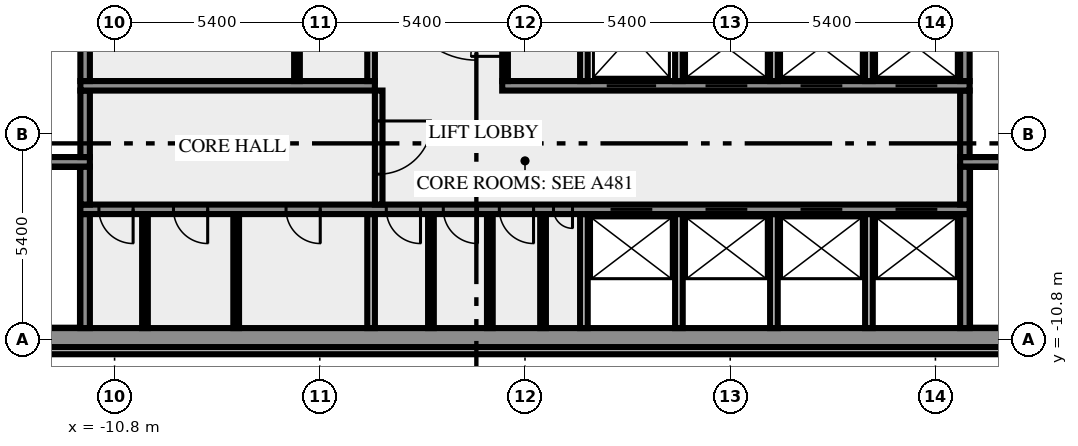
"""IFC4 building model, lengths in metres.
Left out: names, types, materials, properties, quantities, classifications, styles, units other than length and angle.
Written with IfcOpenShell. Run it as: python <this file> out.ifc"""

import sys

from ifc_helpers import new_model, si_unit, direction, frame, frame_2d, origin, place, context, subcontext, project, spatial, rectangle, extrude, element, fill, save


model = new_model("IFC4")
c1 = context("Model", 3, precision=1e-05, world=origin(), true_north=direction((0.0, 1.0)))
c2 = subcontext(c1, "Body", "Model", "MODEL_VIEW")
j1 = project(units=[si_unit("LENGTHUNIT", "METRE"), si_unit("PLANEANGLEUNIT", "RADIAN")], contexts=[c1])
p1 = place(None, origin())
s1 = spatial("IfcSite", under=j1, at=p1, CompositionType="ELEMENT")
p2 = place(p1, origin())
s2 = spatial("IfcBuilding", under=s1, at=p2, CompositionType="ELEMENT")
p3 = place(p2, frame((0.0, 0.0, 156.0)))
s3 = spatial("IfcBuildingStorey", under=s2, at=p3, CompositionType="ELEMENT", Elevation=156.0)
p4 = place(p3, frame((-17.444, -11.088, 0.0), z_axis=(0.0, 0.0, 1.0), x_axis=(1.0, 0.0, 0.0)))
e1 = element("IfcWall", 1, at=p4, inside=s3, PredefinedType="SOLIDWALL", context=c2, shape_type="SweptSolid", body=[
    extrude(rectangle(XDim=34.888, YDim=0.2, at=frame_2d((17.444, 0.0))), origin(), (0.0, 0.0, 1.0), 3.65),
])
p5 = place(p3, frame((-20.0, -10.75, 0.0), z_axis=(0.0, 0.0, 1.0), x_axis=(1.0, 0.0, 0.0)))
e2 = element("IfcWall", 2, at=p5, inside=s3, PredefinedType="SHEAR", context=c2, shape_type="SweptSolid", body=[
    extrude(rectangle(XDim=40.0, YDim=0.5, at=frame_2d((20.0, 0.0))), origin(), (0.0, 0.0, 1.0), 3.65),
])
p6 = place(p5, frame((0.8, 0.0, 1.0)))
e3 = element("IfcOpeningElement", 3, at=p6, cuts=e2, PredefinedType="OPENING", context=c2, shape_type="SweptSolid", body=[
    extrude(rectangle(XDim=1.2, YDim=1.2, at=frame_2d((0.6, 0.6))), frame((0.0, 0.26, 0.0), z_axis=(0.0, -1.0, 0.0), x_axis=(1.0, 0.0, 0.0)), (0.0, 0.0, 1.0), 0.52),
])
p7 = place(p5, frame((38.0, 0.0, 1.0)))
e4 = element("IfcOpeningElement", 4, at=p7, cuts=e2, PredefinedType="OPENING", context=c2, shape_type="SweptSolid", body=[
    extrude(rectangle(XDim=1.2, YDim=1.2, at=frame_2d((0.6, 0.6))), frame((0.0, 0.26, 0.0), z_axis=(0.0, -1.0, 0.0), x_axis=(1.0, 0.0, 0.0)), (0.0, 0.0, 1.0), 0.52),
])
p8 = place(p3, frame((-11.575, -10.5, 0.0), z_axis=(0.0, 0.0, 1.0), x_axis=(0.0, 1.0, 0.0)))
e5 = element("IfcWall", 5, at=p8, inside=s3, PredefinedType="SHEAR", context=c2, shape_type="SweptSolid", body=[
    extrude(rectangle(XDim=3.0, YDim=0.25, at=frame_2d((1.5, 0.0))), origin(), (0.0, 0.0, 1.0), 3.65),
])
for number, where, z_axis, x_axis in (
    (6, (-10.0, -10.5, 0.0), (0.0, 0.0, 1.0), (0.0, 1.0, 0.0)),
    (7, (-7.6, -10.5, 0.0), (0.0, 0.0, 1.0), (0.0, 1.0, 0.0)),
):
    element("IfcWall", number, at=place(p3, frame(where, z_axis=z_axis, x_axis=x_axis)), inside=s3, PredefinedType="PARTITIONING", context=c2, shape_type="SweptSolid", body=[
        extrude(rectangle(XDim=3.0, YDim=0.15, at=frame_2d((1.5, 0.0))), origin(), (0.0, 0.0, 1.0), 3.65),
    ])
p9 = place(p3, frame((-4.05, -10.5, 0.0), z_axis=(0.0, 0.0, 1.0), x_axis=(0.0, 1.0, 0.0)))
e8 = element("IfcWall", 8, at=p9, inside=s3, PredefinedType="SOLIDWALL", context=c2, shape_type="SweptSolid", body=[
    extrude(rectangle(XDim=3.0, YDim=0.2, at=frame_2d((1.5, 0.0))), origin(), (0.0, 0.0, 1.0), 3.65),
])
for number, where, z_axis, x_axis in (
    (9, (-2.475, -10.5, 0.0), (0.0, 0.0, 1.0), (0.0, 1.0, 0.0)),
    (10, (-0.925, -10.5, 0.0), (0.0, 0.0, 1.0), (0.0, 1.0, 0.0)),
    (11, (0.475, -10.5, 0.0), (0.0, 0.0, 1.0), (0.0, 1.0, 0.0)),
):
    element("IfcWall", number, at=place(p3, frame(where, z_axis=z_axis, x_axis=x_axis)), inside=s3, PredefinedType="PARTITIONING", context=c2, shape_type="SweptSolid", body=[
        extrude(rectangle(XDim=3.0, YDim=0.15, at=frame_2d((1.5, 0.0))), origin(), (0.0, 0.0, 1.0), 3.65),
    ])
for number, where, z_axis, x_axis in (
    (12, (1.55, -10.5, 0.0), (0.0, 0.0, 1.0), (0.0, 1.0, 0.0)),
    (13, (4.05, -10.5, 0.0), (0.0, 0.0, 1.0), (0.0, 1.0, 0.0)),
    (14, (6.55, -10.5, 0.0), (0.0, 0.0, 1.0), (0.0, 1.0, 0.0)),
    (15, (9.05, -10.5, 0.0), (0.0, 0.0, 1.0), (0.0, 1.0, 0.0)),
):
    element("IfcWall", number, at=place(p3, frame(where, z_axis=z_axis, x_axis=x_axis)), inside=s3, PredefinedType="SOLIDWALL", context=c2, shape_type="SweptSolid", body=[
        extrude(rectangle(XDim=3.0, YDim=0.2, at=frame_2d((1.5, 0.0))), origin(), (0.0, 0.0, 1.0), 3.65),
    ])
p10 = place(p3, frame((11.575, -10.5, 0.0), z_axis=(0.0, 0.0, 1.0), x_axis=(0.0, 1.0, 0.0)))
e16 = element("IfcWall", 16, at=p10, inside=s3, PredefinedType="SHEAR", context=c2, shape_type="SweptSolid", body=[
    extrude(rectangle(XDim=3.0, YDim=0.25, at=frame_2d((1.5, 0.0))), origin(), (0.0, 0.0, 1.0), 3.65),
])
p11 = place(p3, frame((11.7, -7.375, 0.0), z_axis=(0.0, 0.0, 1.0), x_axis=(-1.0, 0.0, 0.0)))
e17 = element("IfcWall", 17, at=p11, inside=s3, PredefinedType="SHEAR", context=c2, shape_type="SweptSolid", body=[
    extrude(rectangle(XDim=23.4, YDim=0.25, at=frame_2d((11.7, 0.0))), origin(), (0.0, 0.0, 1.0), 3.65),
])
p12 = place(p11, frame((22.012, 0.0, 0.0)))
e18 = element("IfcOpeningElement", 18, at=p12, cuts=e17, PredefinedType="OPENING", context=c2, shape_type="SweptSolid", body=[
    extrude(rectangle(XDim=0.9, YDim=2.1, at=frame_2d((0.45, 1.05))), frame((0.0, 0.135, 0.0), z_axis=(0.0, -1.0, 0.0), x_axis=(1.0, 0.0, 0.0)), (0.0, 0.0, 1.0), 0.27),
])
p13 = place(p11, frame((20.05, 0.0, 0.0)))
e19 = element("IfcOpeningElement", 19, at=p13, cuts=e17, PredefinedType="OPENING", context=c2, shape_type="SweptSolid", body=[
    extrude(rectangle(XDim=0.9, YDim=2.1, at=frame_2d((0.45, 1.05))), frame((0.0, 0.135, 0.0), z_axis=(0.0, -1.0, 0.0), x_axis=(1.0, 0.0, 0.0)), (0.0, 0.0, 1.0), 0.27),
])
p14 = place(p11, frame((17.088, 0.0, 0.0)))
e20 = element("IfcOpeningElement", 20, at=p14, cuts=e17, PredefinedType="OPENING", context=c2, shape_type="SweptSolid", body=[
    extrude(rectangle(XDim=0.9, YDim=2.1, at=frame_2d((0.45, 1.05))), frame((0.0, 0.135, 0.0), z_axis=(0.0, -1.0, 0.0), x_axis=(1.0, 0.0, 0.0)), (0.0, 0.0, 1.0), 0.27),
])
p15 = place(p11, frame((14.45, 0.0, 0.0)))
e21 = element("IfcOpeningElement", 21, at=p15, cuts=e17, PredefinedType="OPENING", context=c2, shape_type="SweptSolid", body=[
    extrude(rectangle(XDim=0.9, YDim=2.1, at=frame_2d((0.45, 1.05))), frame((0.0, 0.135, 0.0), z_axis=(0.0, -1.0, 0.0), x_axis=(1.0, 0.0, 0.0)), (0.0, 0.0, 1.0), 0.27),
])
p16 = place(p11, frame((12.95, 0.0, 0.0)))
e22 = element("IfcOpeningElement", 22, at=p16, cuts=e17, PredefinedType="OPENING", context=c2, shape_type="SweptSolid", body=[
    extrude(rectangle(XDim=0.9, YDim=2.1, at=frame_2d((0.45, 1.05))), frame((0.0, 0.135, 0.0), z_axis=(0.0, -1.0, 0.0), x_axis=(1.0, 0.0, 0.0)), (0.0, 0.0, 1.0), 0.27),
])
p17 = place(p11, frame((11.475, 0.0, 0.0)))
e23 = element("IfcOpeningElement", 23, at=p17, cuts=e17, PredefinedType="OPENING", context=c2, shape_type="SweptSolid", body=[
    extrude(rectangle(XDim=0.9, YDim=2.1, at=frame_2d((0.45, 1.05))), frame((0.0, 0.135, 0.0), z_axis=(0.0, -1.0, 0.0), x_axis=(1.0, 0.0, 0.0)), (0.0, 0.0, 1.0), 0.27),
])
p18 = place(p11, frame((10.45, 0.0, 0.0)))
e24 = element("IfcOpeningElement", 24, at=p18, cuts=e17, PredefinedType="OPENING", context=c2, shape_type="SweptSolid", body=[
    extrude(rectangle(XDim=0.5, YDim=2.1, at=frame_2d((0.25, 1.05))), frame((0.0, 0.135, 0.0), z_axis=(0.0, -1.0, 0.0), x_axis=(1.0, 0.0, 0.0)), (0.0, 0.0, 1.0), 0.27),
])
p19 = place(p11, frame((8.35, 0.0, 0.0)))
e25 = element("IfcOpeningElement", 25, at=p19, cuts=e17, PredefinedType="OPENING", context=c2, shape_type="SweptSolid", body=[
    extrude(rectangle(XDim=1.1, YDim=2.1, at=frame_2d((0.55, 1.05))), frame((0.0, 0.135, 0.0), z_axis=(0.0, -1.0, 0.0), x_axis=(1.0, 0.0, 0.0)), (0.0, 0.0, 1.0), 0.27),
])
p20 = place(p11, frame((5.85, 0.0, 0.0)))
e26 = element("IfcOpeningElement", 26, at=p20, cuts=e17, PredefinedType="OPENING", context=c2, shape_type="SweptSolid", body=[
    extrude(rectangle(XDim=1.1, YDim=2.1, at=frame_2d((0.55, 1.05))), frame((0.0, 0.135, 0.0), z_axis=(0.0, -1.0, 0.0), x_axis=(1.0, 0.0, 0.0)), (0.0, 0.0, 1.0), 0.27),
])
p21 = place(p11, frame((3.35, 0.0, 0.0)))
e27 = element("IfcOpeningElement", 27, at=p21, cuts=e17, PredefinedType="OPENING", context=c2, shape_type="SweptSolid", body=[
    extrude(rectangle(XDim=1.1, YDim=2.1, at=frame_2d((0.55, 1.05))), frame((0.0, 0.135, 0.0), z_axis=(0.0, -1.0, 0.0), x_axis=(1.0, 0.0, 0.0)), (0.0, 0.0, 1.0), 0.27),
])
p22 = place(p11, frame((0.85, 0.0, 0.0)))
e28 = element("IfcOpeningElement", 28, at=p22, cuts=e17, PredefinedType="OPENING", context=c2, shape_type="SweptSolid", body=[
    extrude(rectangle(XDim=1.1, YDim=2.1, at=frame_2d((0.55, 1.05))), frame((0.0, 0.135, 0.0), z_axis=(0.0, -1.0, 0.0), x_axis=(1.0, 0.0, 0.0)), (0.0, 0.0, 1.0), 0.27),
])
p23 = place(p3, frame((-11.575, -7.25, 0.0), z_axis=(0.0, 0.0, 1.0), x_axis=(0.0, 1.0, 0.0)))
e29 = element("IfcWall", 29, at=p23, inside=s3, PredefinedType="SHEAR", context=c2, shape_type="SweptSolid", body=[
    extrude(rectangle(XDim=1.0, YDim=0.25, at=frame_2d((0.5, 0.0))), origin(), (0.0, 0.0, 1.0), 3.65),
])
p24 = place(p3, frame((-3.85, -4.25, 0.0), z_axis=(0.0, 0.0, 1.0), x_axis=(0.0, -1.0, 0.0)))
e30 = element("IfcWall", 30, at=p24, inside=s3, PredefinedType="SOLIDWALL", context=c2, shape_type="SweptSolid", body=[
    extrude(rectangle(XDim=3.0, YDim=0.2, at=frame_2d((1.5, 0.0))), origin(), (0.0, 0.0, 1.0), 3.65),
])
p25 = place(p24, frame((0.8, 0.0, 0.0)))
e31 = element("IfcOpeningElement", 31, at=p25, cuts=e30, PredefinedType="OPENING", context=c2, shape_type="SweptSolid", body=[
    extrude(rectangle(XDim=1.4, YDim=2.1, at=frame_2d((0.7, 1.05))), frame((0.0, 0.11, 0.0), z_axis=(0.0, -1.0, 0.0), x_axis=(1.0, 0.0, 0.0)), (0.0, 0.0, 1.0), 0.22),
])
p26 = place(p3, frame((11.575, -7.25, 0.0), z_axis=(0.0, 0.0, 1.0), x_axis=(0.0, 1.0, 0.0)))
e32 = element("IfcWall", 32, at=p26, inside=s3, PredefinedType="SHEAR", context=c2, shape_type="SweptSolid", body=[
    extrude(rectangle(XDim=1.0, YDim=0.25, at=frame_2d((0.5, 0.0))), origin(), (0.0, 0.0, 1.0), 3.65),
])
p27 = place(p3, frame((-11.45, -6.125, 0.0), z_axis=(0.0, 0.0, 1.0), x_axis=(-1.0, 0.0, 0.0)))
e33 = element("IfcWall", 33, at=p27, inside=s3, PredefinedType="SHEAR", context=c2, shape_type="SweptSolid", body=[
    extrude(rectangle(XDim=8.05, YDim=0.25, at=frame_2d((4.025, 0.0))), origin(), (0.0, 0.0, 1.0), 3.65),
])
p28 = place(p27, frame((6.2, 0.0, 0.0)))
e34 = element("IfcOpeningElement", 34, at=p28, cuts=e33, PredefinedType="OPENING", context=c2, shape_type="SweptSolid", body=[
    extrude(rectangle(XDim=1.8, YDim=2.1, at=frame_2d((0.9, 1.05))), frame((0.0, 0.135, 0.0), z_axis=(0.0, -1.0, 0.0), x_axis=(1.0, 0.0, 0.0)), (0.0, 0.0, 1.0), 0.27),
])
p29 = place(p3, frame((19.5, -6.125, 0.0), z_axis=(0.0, 0.0, 1.0), x_axis=(-1.0, 0.0, 0.0)))
e35 = element("IfcWall", 35, at=p29, inside=s3, PredefinedType="SHEAR", context=c2, shape_type="SweptSolid", body=[
    extrude(rectangle(XDim=8.05, YDim=0.25, at=frame_2d((4.025, 0.0))), origin(), (0.0, 0.0, 1.0), 3.65),
])
p30 = place(p29, frame((0.05, 0.0, 0.0)))
e36 = element("IfcOpeningElement", 36, at=p30, cuts=e35, PredefinedType="OPENING", context=c2, shape_type="SweptSolid", body=[
    extrude(rectangle(XDim=1.8, YDim=2.1, at=frame_2d((0.9, 1.05))), frame((0.0, 0.135, 0.0), z_axis=(0.0, -1.0, 0.0), x_axis=(1.0, 0.0, 0.0)), (0.0, 0.0, 1.0), 0.27),
])
for number, where, z_axis, x_axis in (
    (37, (-11.575, -6.0, 0.0), (0.0, 0.0, 1.0), (0.0, 1.0, 0.0)),
    (38, (11.575, -6.0, 0.0), (0.0, 0.0, 1.0), (0.0, 1.0, 0.0)),
):
    element("IfcWall", number, at=place(p3, frame(where, z_axis=z_axis, x_axis=x_axis)), inside=s3, PredefinedType="SHEAR", context=c2, shape_type="SweptSolid", body=[
        extrude(rectangle(XDim=1.75, YDim=0.25, at=frame_2d((0.875, 0.0))), origin(), (0.0, 0.0, 1.0), 3.65),
    ])
p31 = place(p3, frame((-11.7, -4.125, 0.0), z_axis=(0.0, 0.0, 1.0), x_axis=(1.0, 0.0, 0.0)))
e39 = element("IfcWall", 39, at=p31, inside=s3, PredefinedType="SHEAR", context=c2, shape_type="SweptSolid", body=[
    extrude(rectangle(XDim=7.75, YDim=0.25, at=frame_2d((3.875, 0.0))), origin(), (0.0, 0.0, 1.0), 3.65),
])
p32 = place(p3, frame((-0.6, -4.125, 0.0), z_axis=(0.0, 0.0, 1.0), x_axis=(1.0, 0.0, 0.0)))
e40 = element("IfcWall", 40, at=p32, inside=s3, PredefinedType="SHEAR", context=c2, shape_type="SweptSolid", body=[
    extrude(rectangle(XDim=12.3, YDim=0.25, at=frame_2d((6.15, 0.0))), origin(), (0.0, 0.0, 1.0), 3.65),
])
p33 = place(p32, frame((2.75, 0.0, 0.0)))
e41 = element("IfcOpeningElement", 41, at=p33, cuts=e40, PredefinedType="OPENING", context=c2, shape_type="SweptSolid", body=[
    extrude(rectangle(XDim=1.3, YDim=2.1, at=frame_2d((0.65, 1.05))), frame((0.0, 0.135, 0.0), z_axis=(0.0, -1.0, 0.0), x_axis=(1.0, 0.0, 0.0)), (0.0, 0.0, 1.0), 0.27),
])
p34 = place(p32, frame((5.35, 0.0, 0.0)))
e42 = element("IfcOpeningElement", 42, at=p34, cuts=e40, PredefinedType="OPENING", context=c2, shape_type="SweptSolid", body=[
    extrude(rectangle(XDim=1.1, YDim=2.1, at=frame_2d((0.55, 1.05))), frame((0.0, 0.135, 0.0), z_axis=(0.0, -1.0, 0.0), x_axis=(1.0, 0.0, 0.0)), (0.0, 0.0, 1.0), 0.27),
])
p35 = place(p32, frame((7.85, 0.0, 0.0)))
e43 = element("IfcOpeningElement", 43, at=p35, cuts=e40, PredefinedType="OPENING", context=c2, shape_type="SweptSolid", body=[
    extrude(rectangle(XDim=1.1, YDim=2.1, at=frame_2d((0.55, 1.05))), frame((0.0, 0.135, 0.0), z_axis=(0.0, -1.0, 0.0), x_axis=(1.0, 0.0, 0.0)), (0.0, 0.0, 1.0), 0.27),
])
p36 = place(p32, frame((10.35, 0.0, 0.0)))
e44 = element("IfcOpeningElement", 44, at=p36, cuts=e40, PredefinedType="OPENING", context=c2, shape_type="SweptSolid", body=[
    extrude(rectangle(XDim=1.1, YDim=2.1, at=frame_2d((0.55, 1.05))), frame((0.0, 0.135, 0.0), z_axis=(0.0, -1.0, 0.0), x_axis=(1.0, 0.0, 0.0)), (0.0, 0.0, 1.0), 0.27),
])
p37 = place(p3, frame((-11.575, -4.0, 0.0), z_axis=(0.0, 0.0, 1.0), x_axis=(0.0, 1.0, 0.0)))
e45 = element("IfcWall", 45, at=p37, inside=s3, PredefinedType="SHEAR", context=c2, shape_type="SweptSolid", body=[
    extrude(rectangle(XDim=2.3, YDim=0.25, at=frame_2d((1.15, 0.0))), origin(), (0.0, 0.0, 1.0), 3.65),
])
p38 = place(p3, frame((-6.0, -4.0, 0.0), z_axis=(0.0, 0.0, 1.0), x_axis=(0.0, 1.0, 0.0)))
e46 = element("IfcWall", 46, at=p38, inside=s3, PredefinedType="PARTITIONING", context=c2, shape_type="SweptSolid", body=[
    extrude(rectangle(XDim=2.3, YDim=0.15, at=frame_2d((1.15, 0.0))), origin(), (0.0, 0.0, 1.0), 3.65),
])
p39 = place(p3, frame((-4.05, -4.0, 0.0), z_axis=(0.0, 0.0, 1.0), x_axis=(0.0, 1.0, 0.0)))
e47 = element("IfcWall", 47, at=p39, inside=s3, PredefinedType="SOLIDWALL", context=c2, shape_type="SweptSolid", body=[
    extrude(rectangle(XDim=2.3, YDim=0.2, at=frame_2d((1.15, 0.0))), origin(), (0.0, 0.0, 1.0), 3.65),
])
p40 = place(p3, frame((-0.525, -4.0, 0.0), z_axis=(0.0, 0.0, 1.0), x_axis=(0.0, 1.0, 0.0)))
e48 = element("IfcWall", 48, at=p40, inside=s3, PredefinedType="PARTITIONING", context=c2, shape_type="SweptSolid", body=[
    extrude(rectangle(XDim=2.3, YDim=0.15, at=frame_2d((1.15, 0.0))), origin(), (0.0, 0.0, 1.0), 3.65),
])
p41 = place(p40, frame((0.65, 0.0, 0.0)))
e49 = element("IfcOpeningElement", 49, at=p41, cuts=e48, PredefinedType="OPENING", context=c2, shape_type="SweptSolid", body=[
    extrude(rectangle(XDim=0.9, YDim=2.1, at=frame_2d((0.45, 1.05))), frame((0.0, 0.085, 0.0), z_axis=(0.0, -1.0, 0.0), x_axis=(1.0, 0.0, 0.0)), (0.0, 0.0, 1.0), 0.17),
])
for number, where, z_axis, x_axis in (
    (50, (1.55, -4.0, 0.0), (0.0, 0.0, 1.0), (0.0, 1.0, 0.0)),
    (51, (4.05, -4.0, 0.0), (0.0, 0.0, 1.0), (0.0, 1.0, 0.0)),
    (52, (6.55, -4.0, 0.0), (0.0, 0.0, 1.0), (0.0, 1.0, 0.0)),
    (53, (9.05, -4.0, 0.0), (0.0, 0.0, 1.0), (0.0, 1.0, 0.0)),
):
    element("IfcWall", number, at=place(p3, frame(where, z_axis=z_axis, x_axis=x_axis)), inside=s3, PredefinedType="SOLIDWALL", context=c2, shape_type="SweptSolid", body=[
        extrude(rectangle(XDim=2.3, YDim=0.2, at=frame_2d((1.15, 0.0))), origin(), (0.0, 0.0, 1.0), 3.65),
    ])
p42 = place(p3, frame((11.575, -4.0, 0.0), z_axis=(0.0, 0.0, 1.0), x_axis=(0.0, 1.0, 0.0)))
e54 = element("IfcWall", 54, at=p42, inside=s3, PredefinedType="SHEAR", context=c2, shape_type="SweptSolid", body=[
    extrude(rectangle(XDim=2.3, YDim=0.25, at=frame_2d((1.15, 0.0))), origin(), (0.0, 0.0, 1.0), 3.65),
])
p43 = place(p12, origin())
e55 = element("IfcDoor", 55, at=p43, inside=s3, OperationType="SINGLE_SWING_RIGHT", PredefinedType="DOOR", context=c2, shape_type="SweptSolid", body=[
    extrude(rectangle(XDim=0.9, YDim=2.1, at=frame_2d((0.45, 1.05))), frame((0.0, 0.025, 0.0), z_axis=(0.0, -1.0, 0.0), x_axis=(1.0, 0.0, 0.0)), (0.0, 0.0, 1.0), 0.05),
])
fill(e18, e55)
p44 = place(p13, origin())
e56 = element("IfcDoor", 56, at=p44, inside=s3, OperationType="SINGLE_SWING_RIGHT", PredefinedType="DOOR", context=c2, shape_type="SweptSolid", body=[
    extrude(rectangle(XDim=0.9, YDim=2.1, at=frame_2d((0.45, 1.05))), frame((0.0, 0.025, 0.0), z_axis=(0.0, -1.0, 0.0), x_axis=(1.0, 0.0, 0.0)), (0.0, 0.0, 1.0), 0.05),
])
fill(e19, e56)
p45 = place(p14, origin())
e57 = element("IfcDoor", 57, at=p45, inside=s3, OperationType="SINGLE_SWING_RIGHT", PredefinedType="DOOR", context=c2, shape_type="SweptSolid", body=[
    extrude(rectangle(XDim=0.9, YDim=2.1, at=frame_2d((0.45, 1.05))), frame((0.0, 0.025, 0.0), z_axis=(0.0, -1.0, 0.0), x_axis=(1.0, 0.0, 0.0)), (0.0, 0.0, 1.0), 0.05),
])
fill(e20, e57)
p46 = place(p15, origin())
e58 = element("IfcDoor", 58, at=p46, inside=s3, OperationType="SINGLE_SWING_RIGHT", PredefinedType="DOOR", context=c2, shape_type="SweptSolid", body=[
    extrude(rectangle(XDim=0.9, YDim=2.1, at=frame_2d((0.45, 1.05))), frame((0.0, 0.025, 0.0), z_axis=(0.0, -1.0, 0.0), x_axis=(1.0, 0.0, 0.0)), (0.0, 0.0, 1.0), 0.05),
])
fill(e21, e58)
p47 = place(p16, origin())
e59 = element("IfcDoor", 59, at=p47, inside=s3, OperationType="SINGLE_SWING_RIGHT", PredefinedType="DOOR", context=c2, shape_type="SweptSolid", body=[
    extrude(rectangle(XDim=0.9, YDim=2.1, at=frame_2d((0.45, 1.05))), frame((0.0, 0.025, 0.0), z_axis=(0.0, -1.0, 0.0), x_axis=(1.0, 0.0, 0.0)), (0.0, 0.0, 1.0), 0.05),
])
fill(e22, e59)
p48 = place(p17, origin())
e60 = element("IfcDoor", 60, at=p48, inside=s3, OperationType="SINGLE_SWING_RIGHT", PredefinedType="DOOR", context=c2, shape_type="SweptSolid", body=[
    extrude(rectangle(XDim=0.9, YDim=2.1, at=frame_2d((0.45, 1.05))), frame((0.0, 0.025, 0.0), z_axis=(0.0, -1.0, 0.0), x_axis=(1.0, 0.0, 0.0)), (0.0, 0.0, 1.0), 0.05),
])
fill(e23, e60)
p49 = place(p18, origin())
e61 = element("IfcDoor", 61, at=p49, inside=s3, OperationType="SINGLE_SWING_LEFT", PredefinedType="DOOR", context=c2, shape_type="SweptSolid", body=[
    extrude(rectangle(XDim=0.5, YDim=2.1, at=frame_2d((0.25, 1.05))), frame((0.0, 0.025, 0.0), z_axis=(0.0, -1.0, 0.0), x_axis=(1.0, 0.0, 0.0)), (0.0, 0.0, 1.0), 0.05),
])
fill(e24, e61)
p50 = place(p19, origin())
e62 = element("IfcDoor", 62, at=p50, inside=s3, OperationType="DOUBLE_DOOR_SLIDING", PredefinedType="DOOR", context=c2, shape_type="SweptSolid", body=[
    extrude(rectangle(XDim=1.1, YDim=2.1, at=frame_2d((0.55, 1.05))), frame((0.0, 0.025, 0.0), z_axis=(0.0, -1.0, 0.0), x_axis=(1.0, 0.0, 0.0)), (0.0, 0.0, 1.0), 0.05),
])
fill(e25, e62)
p51 = place(p20, origin())
e63 = element("IfcDoor", 63, at=p51, inside=s3, OperationType="DOUBLE_DOOR_SLIDING", PredefinedType="DOOR", context=c2, shape_type="SweptSolid", body=[
    extrude(rectangle(XDim=1.1, YDim=2.1, at=frame_2d((0.55, 1.05))), frame((0.0, 0.025, 0.0), z_axis=(0.0, -1.0, 0.0), x_axis=(1.0, 0.0, 0.0)), (0.0, 0.0, 1.0), 0.05),
])
fill(e26, e63)
p52 = place(p21, origin())
e64 = element("IfcDoor", 64, at=p52, inside=s3, OperationType="DOUBLE_DOOR_SLIDING", PredefinedType="DOOR", context=c2, shape_type="SweptSolid", body=[
    extrude(rectangle(XDim=1.1, YDim=2.1, at=frame_2d((0.55, 1.05))), frame((0.0, 0.025, 0.0), z_axis=(0.0, -1.0, 0.0), x_axis=(1.0, 0.0, 0.0)), (0.0, 0.0, 1.0), 0.05),
])
fill(e27, e64)
p53 = place(p22, origin())
e65 = element("IfcDoor", 65, at=p53, inside=s3, OperationType="DOUBLE_DOOR_SLIDING", PredefinedType="DOOR", context=c2, shape_type="SweptSolid", body=[
    extrude(rectangle(XDim=1.1, YDim=2.1, at=frame_2d((0.55, 1.05))), frame((0.0, 0.025, 0.0), z_axis=(0.0, -1.0, 0.0), x_axis=(1.0, 0.0, 0.0)), (0.0, 0.0, 1.0), 0.05),
])
fill(e28, e65)
p54 = place(p25, origin())
e66 = element("IfcDoor", 66, at=p54, inside=s3, OperationType="DOUBLE_DOOR_SINGLE_SWING", PredefinedType="DOOR", context=c2, shape_type="SweptSolid", body=[
    extrude(rectangle(XDim=1.4, YDim=2.1, at=frame_2d((0.7, 1.05))), frame((0.0, 0.025, 0.0), z_axis=(0.0, -1.0, 0.0), x_axis=(1.0, 0.0, 0.0)), (0.0, 0.0, 1.0), 0.05),
])
fill(e31, e66)
p55 = place(p33, origin())
e67 = element("IfcDoor", 67, at=p55, inside=s3, OperationType="DOUBLE_DOOR_SLIDING", PredefinedType="DOOR", context=c2, shape_type="SweptSolid", body=[
    extrude(rectangle(XDim=1.3, YDim=2.1, at=frame_2d((0.65, 1.05))), frame((0.0, 0.025, 0.0), z_axis=(0.0, -1.0, 0.0), x_axis=(1.0, 0.0, 0.0)), (0.0, 0.0, 1.0), 0.05),
])
fill(e41, e67)
p56 = place(p34, origin())
e68 = element("IfcDoor", 68, at=p56, inside=s3, OperationType="DOUBLE_DOOR_SLIDING", PredefinedType="DOOR", context=c2, shape_type="SweptSolid", body=[
    extrude(rectangle(XDim=1.1, YDim=2.1, at=frame_2d((0.55, 1.05))), frame((0.0, 0.025, 0.0), z_axis=(0.0, -1.0, 0.0), x_axis=(1.0, 0.0, 0.0)), (0.0, 0.0, 1.0), 0.05),
])
fill(e42, e68)
p57 = place(p35, origin())
e69 = element("IfcDoor", 69, at=p57, inside=s3, OperationType="DOUBLE_DOOR_SLIDING", PredefinedType="DOOR", context=c2, shape_type="SweptSolid", body=[
    extrude(rectangle(XDim=1.1, YDim=2.1, at=frame_2d((0.55, 1.05))), frame((0.0, 0.025, 0.0), z_axis=(0.0, -1.0, 0.0), x_axis=(1.0, 0.0, 0.0)), (0.0, 0.0, 1.0), 0.05),
])
fill(e43, e69)
p58 = place(p36, origin())
e70 = element("IfcDoor", 70, at=p58, inside=s3, OperationType="DOUBLE_DOOR_SLIDING", PredefinedType="DOOR", context=c2, shape_type="SweptSolid", body=[
    extrude(rectangle(XDim=1.1, YDim=2.1, at=frame_2d((0.55, 1.05))), frame((0.0, 0.025, 0.0), z_axis=(0.0, -1.0, 0.0), x_axis=(1.0, 0.0, 0.0)), (0.0, 0.0, 1.0), 0.05),
])
fill(e44, e70)
p59 = place(p41, origin())
e71 = element("IfcDoor", 71, at=p59, inside=s3, OperationType="SINGLE_SWING_LEFT", PredefinedType="DOOR", context=c2, shape_type="SweptSolid", body=[
    extrude(rectangle(XDim=0.9, YDim=2.1, at=frame_2d((0.45, 1.05))), frame((0.0, 0.025, 0.0), z_axis=(0.0, -1.0, 0.0), x_axis=(1.0, 0.0, 0.0)), (0.0, 0.0, 1.0), 0.05),
])
fill(e49, e71)
save(model, sys.argv[1])
